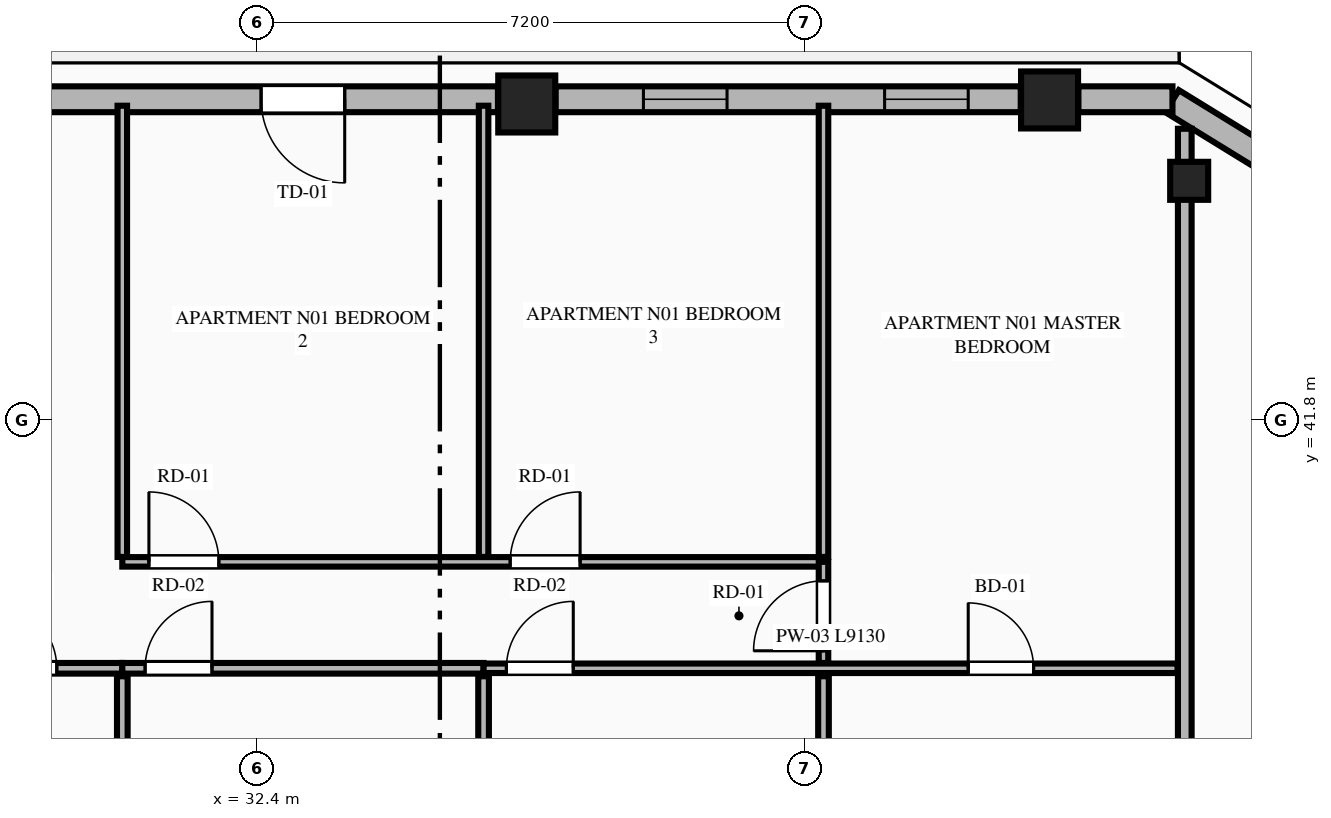
"""IFC4 building model, lengths in metres.
Left out: names, types, materials, properties, quantities, classifications, styles, units other than length and angle.
Written with IfcOpenShell. Run it as: python <this file> out.ifc"""

import sys

from ifc_helpers import new_model, si_unit, direction, frame, frame_2d, origin, origin_2d, place, context, subcontext, project, spatial, rectangle, extrude, element, fill, save


model = new_model("IFC4")
c1 = context("Model", 3, precision=1e-05, world=origin(), true_north=direction((0.0, 1.0)))
c2 = subcontext(c1, "Body", "Model", "MODEL_VIEW")
j1 = project(units=[si_unit("LENGTHUNIT", "METRE"), si_unit("PLANEANGLEUNIT", "RADIAN")], contexts=[c1])
p1 = place(None, origin())
s1 = spatial("IfcSite", under=j1, at=p1, CompositionType="ELEMENT")
p2 = place(p1, origin())
s2 = spatial("IfcBuilding", under=s1, at=p2, CompositionType="ELEMENT")
p3 = place(p2, frame((0.0, 0.0, 218.05)))
s3 = spatial("IfcBuildingStorey", under=s2, at=p3, CompositionType="ELEMENT", Elevation=218.05)
for number, where, z_axis, x_axis in (
    (1, (42.821, 46.011, 0.0), (0.0, 0.0, 1.0), (1.0, 0.0, 0.0)),
    (2, (35.943, 45.958, 0.0), (0.0, 0.0, 1.0), (1.0, 0.0, 0.0)),
):
    element("IfcColumn", number, at=place(p3, frame(where, z_axis=z_axis, x_axis=x_axis)), inside=s3, PredefinedType="COLUMN", context=c2, shape_type="SweptSolid", body=[
        extrude(rectangle(XDim=0.75, YDim=0.75, at=origin_2d()), origin(), (0.0, 0.0, 1.0), 3.55),
    ])
p4 = place(p3, frame((44.658, 44.947, 0.0), z_axis=(0.0, 0.0, 1.0), x_axis=(-0.865230187018, 0.501374833306, 0.0)))
e3 = element("IfcColumn", 3, at=p4, inside=s3, PredefinedType="PILASTER", context=c2, shape_type="SweptSolid", body=[
    extrude(rectangle(XDim=0.5, YDim=0.35, at=origin_2d()), origin(), (0.0, 0.0, 1.0), 3.55),
])
p5 = place(p3, frame((45.862, 45.116, 0.0), z_axis=(0.0, 0.0, 1.0), x_axis=(-0.851713271379, 0.524008113828, 0.0)))
e4 = element("IfcWall", 4, at=p5, inside=s3, PredefinedType="STANDARD", context=c2, shape_type="SweptSolid", body=[
    extrude(rectangle(XDim=1.678, YDim=0.34, at=frame_2d((0.839, 0.0))), origin(), (0.0, 0.0, 1.0), 3.27),
])
p6 = place(p3, frame((44.438, 46.02, 0.0), z_axis=(0.0, 0.0, 1.0), x_axis=(-1.0, 0.0, 0.0)))
e5 = element("IfcWall", 5, at=p6, inside=s3, PredefinedType="STANDARD", context=c2, shape_type="SweptSolid", body=[
    extrude(rectangle(XDim=1.238, YDim=0.34, at=frame_2d((0.619, 0.0))), origin(), (0.0, 0.0, 1.0), 3.27),
])
p7 = place(p3, frame((42.442, 46.02, 0.0), z_axis=(0.0, 0.0, 1.0), x_axis=(-1.0, 0.0, 0.0)))
e6 = element("IfcWall", 6, at=p7, inside=s3, PredefinedType="STANDARD", context=c2, shape_type="SweptSolid", body=[
    extrude(rectangle(XDim=6.12, YDim=0.34, at=frame_2d((3.06, 0.0))), origin(), (0.0, 0.0, 1.0), 2.803),
])
p8 = place(p7, frame((0.691, 0.0, 0.75)))
e7 = element("IfcOpeningElement", 7, at=p8, cuts=e6, PredefinedType="OPENING", context=c2, shape_type="SweptSolid", body=[
    extrude(rectangle(XDim=1.1, YDim=1.903, at=frame_2d((0.55, 0.952))), frame((0.0, 0.18, 0.0), z_axis=(0.0, -1.0, 0.0), x_axis=(1.0, 0.0, 0.0)), (0.0, 0.0, 1.0), 0.36),
])
p9 = place(p7, frame((3.864, 0.0, 0.75)))
e8 = element("IfcOpeningElement", 8, at=p9, cuts=e6, PredefinedType="OPENING", context=c2, shape_type="SweptSolid", body=[
    extrude(rectangle(XDim=1.1, YDim=1.903, at=frame_2d((0.55, 0.952))), frame((0.0, 0.18, 0.0), z_axis=(0.0, -1.0, 0.0), x_axis=(1.0, 0.0, 0.0)), (0.0, 0.0, 1.0), 0.36),
])
p10 = place(p3, frame((35.564, 46.02, 0.0), z_axis=(0.0, 0.0, 1.0), x_axis=(-1.0, 0.0, 0.0)))
e9 = element("IfcWall", 9, at=p10, inside=s3, PredefinedType="STANDARD", context=c2, shape_type="SweptSolid", body=[
    extrude(rectangle(XDim=6.328, YDim=0.34, at=frame_2d((3.164, 0.0))), origin(), (0.0, 0.0, 1.0), 2.803),
])
p11 = place(p10, frame((2.016, 0.0, 0.0)))
e10 = element("IfcOpeningElement", 10, at=p11, cuts=e9, PredefinedType="OPENING", context=c2, shape_type="SweptSolid", body=[
    extrude(rectangle(XDim=1.1, YDim=2.25, at=frame_2d((0.55, 1.125))), frame((0.0, 0.18, 0.0), z_axis=(0.0, -1.0, 0.0), x_axis=(1.0, 0.0, 0.0)), (0.0, 0.0, 1.0), 0.36),
])
p12 = place(p3, frame((44.6, 35.15, 0.0), z_axis=(0.0, 0.0, 1.0), x_axis=(0.0, 1.0, 0.0)))
e11 = element("IfcWall", 11, at=p12, inside=s3, PredefinedType="PARTITIONING", context=c2, shape_type="SweptSolid", body=[
    extrude(rectangle(XDim=10.482, YDim=0.18, at=frame_2d((5.241, 0.0))), origin(), (0.0, 0.0, 1.0), 3.27),
])
p13 = place(p3, frame((22.25, 38.534, 0.0), z_axis=(0.0, 0.0, 1.0), x_axis=(1.0, 0.0, 0.0)))
e12 = element("IfcWall", 12, at=p13, inside=s3, PredefinedType="PLUMBINGWALL", context=c2, shape_type="SweptSolid", body=[
    extrude(rectangle(XDim=8.372, YDim=0.14, at=frame_2d((4.186, 0.0))), origin(), (0.0, 0.0, 1.0), 3.27),
])
p14 = place(p13, frame((6.65, 0.0, 0.0)))
e13 = element("IfcOpeningElement", 13, at=p14, cuts=e12, PredefinedType="OPENING", context=c2, shape_type="SweptSolid", body=[
    extrude(rectangle(XDim=0.86, YDim=2.1, at=frame_2d((0.43, 1.05))), frame((0.0, 0.08, 0.0), z_axis=(0.0, -1.0, 0.0), x_axis=(1.0, 0.0, 0.0)), (0.0, 0.0, 1.0), 0.16),
])
p15 = place(p13, frame((0.26, 0.0, 0.0)))
e14 = element("IfcOpeningElement", 14, at=p15, cuts=e12, PredefinedType="OPENING", context=c2, shape_type="SweptSolid", body=[
    extrude(rectangle(XDim=0.88, YDim=2.15, at=frame_2d((0.44, 1.075))), frame((0.0, 0.08, 0.0), z_axis=(0.0, -1.0, 0.0), x_axis=(1.0, 0.0, 0.0)), (0.0, 0.0, 1.0), 0.16),
])
p16 = place(p13, frame((4.039, 0.0, 0.0)))
e15 = element("IfcOpeningElement", 15, at=p16, cuts=e12, PredefinedType="OPENING", context=c2, shape_type="SweptSolid", body=[
    extrude(rectangle(XDim=0.88, YDim=2.15, at=frame_2d((0.44, 1.075))), frame((0.0, 0.08, 0.0), z_axis=(0.0, -1.0, 0.0), x_axis=(1.0, 0.0, 0.0)), (0.0, 0.0, 1.0), 0.16),
])
p17 = place(p3, frame((30.622, 38.534, 0.0), z_axis=(0.0, 0.0, 1.0), x_axis=(1.0, 0.0, 0.0)))
e16 = element("IfcWall", 16, at=p17, inside=s3, PredefinedType="PLUMBINGWALL", context=c2, shape_type="SweptSolid", body=[
    extrude(rectangle(XDim=4.753, YDim=0.14, at=frame_2d((2.376, 0.0))), origin(), (0.0, 0.0, 1.0), 3.27),
])
p18 = place(p17, frame((0.3, 0.0, 0.0)))
e17 = element("IfcOpeningElement", 17, at=p18, cuts=e16, PredefinedType="OPENING", context=c2, shape_type="SweptSolid", body=[
    extrude(rectangle(XDim=0.88, YDim=2.15, at=frame_2d((0.44, 1.075))), frame((0.0, 0.08, 0.0), z_axis=(0.0, -1.0, 0.0), x_axis=(1.0, 0.0, 0.0)), (0.0, 0.0, 1.0), 0.16),
])
p19 = place(p3, frame((35.375, 38.534, 0.0), z_axis=(0.0, 0.0, 1.0), x_axis=(1.0, 0.0, 0.0)))
e18 = element("IfcWall", 18, at=p19, inside=s3, PredefinedType="PARTITIONING", context=c2, shape_type="SweptSolid", body=[
    extrude(rectangle(XDim=9.13, YDim=0.125, at=frame_2d((4.565, 0.0))), origin(), (0.0, 0.0, 1.0), 3.27),
])
p20 = place(p19, frame((6.376, 0.0, 0.0)))
e19 = element("IfcOpeningElement", 19, at=p20, cuts=e18, PredefinedType="OPENING", context=c2, shape_type="SweptSolid", body=[
    extrude(rectangle(XDim=0.86, YDim=2.1, at=frame_2d((0.43, 1.05))), frame((0.0, 0.073, 0.0), z_axis=(0.0, -1.0, 0.0), x_axis=(1.0, 0.0, 0.0)), (0.0, 0.0, 1.0), 0.145),
])
p21 = place(p19, frame((0.3, 0.0, 0.0)))
e20 = element("IfcOpeningElement", 20, at=p21, cuts=e18, PredefinedType="OPENING", context=c2, shape_type="SweptSolid", body=[
    extrude(rectangle(XDim=0.88, YDim=2.15, at=frame_2d((0.44, 1.075))), frame((0.0, 0.073, 0.0), z_axis=(0.0, -1.0, 0.0), x_axis=(1.0, 0.0, 0.0)), (0.0, 0.0, 1.0), 0.145),
])
p22 = place(p3, frame((30.622, 39.999, 0.0), z_axis=(0.0, 0.0, 1.0), x_axis=(0.0, 1.0, 0.0)))
e21 = element("IfcWall", 21, at=p22, inside=s3, PredefinedType="PARTITIONING", context=c2, shape_type="SweptSolid", body=[
    extrude(rectangle(XDim=5.936, YDim=0.125, at=frame_2d((2.968, 0.0))), origin(), (0.0, 0.0, 1.0), 3.27),
])
p23 = place(p3, frame((30.622, 39.934, 0.0), z_axis=(0.0, 0.0, 1.0), x_axis=(1.0, 0.0, 0.0)))
e22 = element("IfcWall", 22, at=p23, inside=s3, PredefinedType="PARTITIONING", context=c2, shape_type="SweptSolid", body=[
    extrude(rectangle(XDim=9.225, YDim=0.125, at=frame_2d((4.612, 0.0))), origin(), (0.0, 0.0, 1.0), 3.27),
])
p24 = place(p23, frame((0.35, 0.0, 0.0)))
e23 = element("IfcOpeningElement", 23, at=p24, cuts=e22, PredefinedType="OPENING", context=c2, shape_type="SweptSolid", body=[
    extrude(rectangle(XDim=0.92, YDim=2.15, at=frame_2d((0.46, 1.075))), frame((0.0, 0.073, 0.0), z_axis=(0.0, -1.0, 0.0), x_axis=(1.0, 0.0, 0.0)), (0.0, 0.0, 1.0), 0.145),
])
p25 = place(p23, frame((5.103, 0.0, 0.0)))
e24 = element("IfcOpeningElement", 24, at=p25, cuts=e22, PredefinedType="OPENING", context=c2, shape_type="SweptSolid", body=[
    extrude(rectangle(XDim=0.92, YDim=2.15, at=frame_2d((0.46, 1.075))), frame((0.0, 0.073, 0.0), z_axis=(0.0, -1.0, 0.0), x_axis=(1.0, 0.0, 0.0)), (0.0, 0.0, 1.0), 0.145),
])
p26 = place(p3, frame((39.847, 38.604, 0.0), z_axis=(0.0, 0.0, 1.0), x_axis=(0.0, 1.0, 0.0)))
e25 = element("IfcWall", 25, at=p26, inside=s3, PredefinedType="PARTITIONING", context=c2, shape_type="SweptSolid", body=[
    extrude(rectangle(XDim=1.33, YDim=0.125, at=frame_2d((0.665, 0.0))), origin(), (0.0, 0.0, 1.0), 3.27),
])
p27 = place(p26, frame((0.16, 0.0, 0.0)))
e26 = element("IfcOpeningElement", 26, at=p27, cuts=e25, PredefinedType="OPENING", context=c2, shape_type="SweptSolid", body=[
    extrude(rectangle(XDim=0.92, YDim=2.15, at=frame_2d((0.46, 1.075))), frame((0.0, 0.073, 0.0), z_axis=(0.0, -1.0, 0.0), x_axis=(1.0, 0.0, 0.0)), (0.0, 0.0, 1.0), 0.145),
])
for number, where, z_axis, x_axis in (
    (27, (30.622, 35.235, 0.0), (0.0, 0.0, 1.0), (0.0, 1.0, 0.0)),
    (28, (35.375, 35.235, 0.0), (0.0, 0.0, 1.0), (0.0, 1.0, 0.0)),
):
    element("IfcWall", number, at=place(p3, frame(where, z_axis=z_axis, x_axis=x_axis)), inside=s3, PredefinedType="PLUMBINGWALL", context=c2, shape_type="SweptSolid", body=[
        extrude(rectangle(XDim=3.194, YDim=0.14, at=frame_2d((1.597, 0.0))), origin(), (0.0, 0.0, 1.0), 3.27),
    ])
for number, where, z_axis, x_axis in (
    (29, (35.375, 39.999, 0.0), (0.0, 0.0, 1.0), (0.0, 1.0, 0.0)),
    (30, (39.847, 39.999, 0.0), (0.0, 0.0, 1.0), (0.0, 1.0, 0.0)),
):
    element("IfcWall", number, at=place(p3, frame(where, z_axis=z_axis, x_axis=x_axis)), inside=s3, PredefinedType="PARTITIONING", context=c2, shape_type="SweptSolid", body=[
        extrude(rectangle(XDim=5.936, YDim=0.125, at=frame_2d((2.968, 0.0))), origin(), (0.0, 0.0, 1.0), 3.27),
    ])
p28 = place(p3, frame((39.847, 35.235, 0.0), z_axis=(0.0, 0.0, 1.0), x_axis=(0.0, 1.0, 0.0)))
e31 = element("IfcWall", 31, at=p28, inside=s3, PredefinedType="PLUMBINGWALL", context=c2, shape_type="SweptSolid", body=[
    extrude(rectangle(XDim=3.194, YDim=0.14, at=frame_2d((1.597, 0.0))), origin(), (0.0, 0.0, 1.0), 3.27),
])
p29 = place(p8, origin())
e32 = element("IfcWindow", 32, at=p29, inside=s3, PartitioningType="SINGLE_PANEL", PredefinedType="WINDOW", context=c2, shape_type="SweptSolid", body=[
    extrude(rectangle(XDim=1.1, YDim=1.903, at=frame_2d((0.55, 0.952))), frame((0.0, 0.03, 0.0), z_axis=(0.0, -1.0, 0.0), x_axis=(1.0, 0.0, 0.0)), (0.0, 0.0, 1.0), 0.06),
])
fill(e7, e32)
p30 = place(p11, origin())
e33 = element("IfcDoor", 33, at=p30, inside=s3, OperationType="SINGLE_SWING_LEFT", PredefinedType="DOOR", context=c2, shape_type="SweptSolid", body=[
    extrude(rectangle(XDim=1.1, YDim=2.25, at=frame_2d((0.55, 1.125))), frame((0.0, 0.025, 0.0), z_axis=(0.0, -1.0, 0.0), x_axis=(1.0, 0.0, 0.0)), (0.0, 0.0, 1.0), 0.05),
])
fill(e10, e33)
p31 = place(p14, origin())
e34 = element("IfcDoor", 34, at=p31, inside=s3, OperationType="SINGLE_SWING_LEFT", PredefinedType="DOOR", context=c2, shape_type="SweptSolid", body=[
    extrude(rectangle(XDim=0.86, YDim=2.1, at=frame_2d((0.43, 1.05))), frame((0.0, 0.025, 0.0), z_axis=(0.0, -1.0, 0.0), x_axis=(1.0, 0.0, 0.0)), (0.0, 0.0, 1.0), 0.05),
])
fill(e13, e34)
p32 = place(p20, origin())
e35 = element("IfcDoor", 35, at=p32, inside=s3, OperationType="SINGLE_SWING_LEFT", PredefinedType="DOOR", context=c2, shape_type="SweptSolid", body=[
    extrude(rectangle(XDim=0.86, YDim=2.1, at=frame_2d((0.43, 1.05))), frame((0.0, 0.025, 0.0), z_axis=(0.0, -1.0, 0.0), x_axis=(1.0, 0.0, 0.0)), (0.0, 0.0, 1.0), 0.05),
])
fill(e19, e35)
p33 = place(p18, origin())
e36 = element("IfcDoor", 36, at=p33, inside=s3, OperationType="SINGLE_SWING_RIGHT", PredefinedType="DOOR", context=c2, shape_type="SweptSolid", body=[
    extrude(rectangle(XDim=0.88, YDim=2.15, at=frame_2d((0.44, 1.075))), frame((0.0, 0.025, 0.0), z_axis=(0.0, -1.0, 0.0), x_axis=(1.0, 0.0, 0.0)), (0.0, 0.0, 1.0), 0.05),
])
fill(e17, e36)
p34 = place(p24, origin())
e37 = element("IfcDoor", 37, at=p34, inside=s3, OperationType="SINGLE_SWING_LEFT", PredefinedType="DOOR", context=c2, shape_type="SweptSolid", body=[
    extrude(rectangle(XDim=0.92, YDim=2.15, at=frame_2d((0.46, 1.075))), frame((0.0, 0.025, 0.0), z_axis=(0.0, -1.0, 0.0), x_axis=(1.0, 0.0, 0.0)), (0.0, 0.0, 1.0), 0.05),
])
fill(e23, e37)
p35 = place(p25, origin())
e38 = element("IfcDoor", 38, at=p35, inside=s3, OperationType="SINGLE_SWING_RIGHT", PredefinedType="DOOR", context=c2, shape_type="SweptSolid", body=[
    extrude(rectangle(XDim=0.92, YDim=2.15, at=frame_2d((0.46, 1.075))), frame((0.0, 0.025, 0.0), z_axis=(0.0, -1.0, 0.0), x_axis=(1.0, 0.0, 0.0)), (0.0, 0.0, 1.0), 0.05),
])
fill(e24, e38)
p36 = place(p27, origin())
e39 = element("IfcDoor", 39, at=p36, inside=s3, OperationType="SINGLE_SWING_LEFT", PredefinedType="DOOR", context=c2, shape_type="SweptSolid", body=[
    extrude(rectangle(XDim=0.92, YDim=2.15, at=frame_2d((0.46, 1.075))), frame((0.0, 0.025, 0.0), z_axis=(0.0, -1.0, 0.0), x_axis=(1.0, 0.0, 0.0)), (0.0, 0.0, 1.0), 0.05),
])
fill(e26, e39)
p37 = place(p21, origin())
e40 = element("IfcDoor", 40, at=p37, inside=s3, OperationType="SINGLE_SWING_RIGHT", PredefinedType="DOOR", context=c2, shape_type="SweptSolid", body=[
    extrude(rectangle(XDim=0.88, YDim=2.15, at=frame_2d((0.44, 1.075))), frame((0.0, 0.025, 0.0), z_axis=(0.0, -1.0, 0.0), x_axis=(1.0, 0.0, 0.0)), (0.0, 0.0, 1.0), 0.05),
])
fill(e20, e40)
p38 = place(p9, origin())
e41 = element("IfcWindow", 41, at=p38, inside=s3, PartitioningType="SINGLE_PANEL", PredefinedType="WINDOW", context=c2, shape_type="SweptSolid", body=[
    extrude(rectangle(XDim=1.1, YDim=1.903, at=frame_2d((0.55, 0.952))), frame((0.0, 0.03, 0.0), z_axis=(0.0, -1.0, 0.0), x_axis=(1.0, 0.0, 0.0)), (0.0, 0.0, 1.0), 0.06),
])
fill(e8, e41)
save(model, sys.argv[1])
